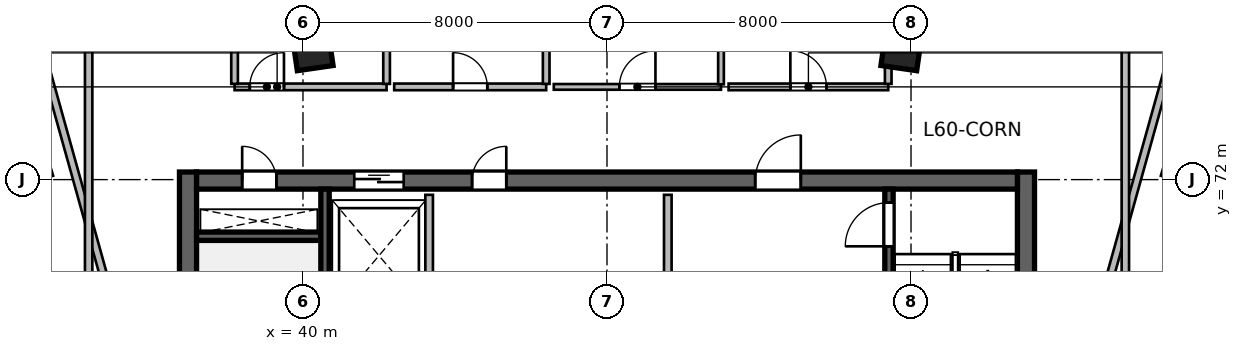
"""IFC4 building model, lengths in metres.
Left out: names, types, materials, properties, quantities, classifications, styles, units other than length and angle.
Written with IfcOpenShell. Run it as: python <this file> out.ifc"""

import sys

from ifc_helpers import new_model, si_unit, direction, frame, frame_2d, origin, origin_2d, place, context, subcontext, project, spatial, rectangle, extrude, source, transform, mapped, element, fill, save


model = new_model("IFC4")
c1 = context("Model", 3, precision=1e-05, world=origin(), true_north=direction((0.0, 1.0)))
c2 = subcontext(c1, "Body", "Model", "MODEL_VIEW")
j1 = project(units=[si_unit("LENGTHUNIT", "METRE"), si_unit("PLANEANGLEUNIT", "RADIAN")], contexts=[c1])
p1 = place(None, origin())
s1 = spatial("IfcSite", under=j1, at=p1, CompositionType="ELEMENT")
p2 = place(p1, origin())
s2 = spatial("IfcBuilding", under=s1, at=p2, CompositionType="ELEMENT")
p3 = place(p2, frame((0.0, 0.0, 246.9)))
s3 = spatial("IfcBuildingStorey", under=s2, at=p3, CompositionType="ELEMENT", Elevation=246.9)
m1 = source(origin(), c2, "Body", "SweptSolid", [
    extrude(rectangle(XDim=12.0, YDim=0.45, at=frame_2d((6.0, 0.0))), origin(), (0.0, 0.0, 1.0), 3.9),
])
for number, where, z_axis, x_axis in (
    (1, (36.975, 60.2, 0.0), (0.0, 0.0, 1.0), (0.0, 1.0, 0.0)),
    (2, (59.025, 60.2, 0.0), (0.0, 0.0, 1.0), (0.0, 1.0, 0.0)),
):
    element("IfcWall", number, at=place(p3, frame(where, z_axis=z_axis, x_axis=x_axis)), inside=s3, PredefinedType="SHEAR", context=c2, shape_type="MappedRepresentation", body=[
        mapped(m1, transform((0.0, 0.0, 0.0), scale=1.0)),
    ])
m2 = source(origin(), c2, "Body", "SweptSolid", [
    extrude(rectangle(XDim=21.6, YDim=0.45, at=frame_2d((10.8, 0.0))), origin(), (0.0, 0.0, 1.0), 3.9),
])
p4 = place(p3, frame((37.2, 71.975, 0.0), z_axis=(0.0, 0.0, 1.0), x_axis=(1.0, 0.0, 0.0)))
e3 = element("IfcWall", 3, at=p4, inside=s3, PredefinedType="SHEAR", context=c2, shape_type="MappedRepresentation", body=[
    mapped(m2, transform((0.0, 0.0, 0.0), scale=1.0)),
])
p5 = place(p4, frame((1.2, 0.0, 0.0)))
e4 = element("IfcOpeningElement", 4, at=p5, cuts=e3, PredefinedType="OPENING", context=c2, shape_type="SweptSolid", body=[
    extrude(rectangle(XDim=0.9, YDim=2.1, at=frame_2d((0.45, 1.05))), frame((0.0, 0.235, 0.0), z_axis=(0.0, -1.0, 0.0), x_axis=(1.0, 0.0, 0.0)), (0.0, 0.0, 1.0), 0.47),
])
p6 = place(p4, frame((14.7, 0.0, 0.0)))
e5 = element("IfcOpeningElement", 5, at=p6, cuts=e3, PredefinedType="OPENING", context=c2, shape_type="SweptSolid", body=[
    extrude(rectangle(XDim=1.2, YDim=2.15, at=frame_2d((0.6, 1.075))), frame((0.0, 0.235, 0.0), z_axis=(0.0, -1.0, 0.0), x_axis=(1.0, 0.0, 0.0)), (0.0, 0.0, 1.0), 0.47),
])
p7 = place(p4, frame((4.15, 0.0, 0.0)))
e6 = element("IfcOpeningElement", 6, at=p7, cuts=e3, PredefinedType="OPENING", context=c2, shape_type="SweptSolid", body=[
    extrude(rectangle(XDim=1.3, YDim=2.15, at=frame_2d((0.65, 1.075))), frame((0.0, 0.235, 0.0), z_axis=(0.0, -1.0, 0.0), x_axis=(1.0, 0.0, 0.0)), (0.0, 0.0, 1.0), 0.47),
])
p8 = place(p4, frame((7.25, 0.0, 0.0)))
e7 = element("IfcOpeningElement", 7, at=p8, cuts=e3, PredefinedType="OPENING", context=c2, shape_type="SweptSolid", body=[
    extrude(rectangle(XDim=0.9, YDim=2.1, at=frame_2d((0.45, 1.05))), frame((0.0, 0.235, 0.0), z_axis=(0.0, -1.0, 0.0), x_axis=(1.0, 0.0, 0.0)), (0.0, 0.0, 1.0), 0.47),
])
m3 = source(origin(), c2, "Body", "SweptSolid", [
    extrude(rectangle(XDim=3.27, YDim=0.22, at=frame_2d((1.635, 0.0))), origin(), (0.0, 0.0, 1.0), 3.9),
])
p9 = place(p3, frame((37.2, 70.51, 0.0), z_axis=(0.0, 0.0, 1.0), x_axis=(1.0, 0.0, 0.0)))
e8 = element("IfcWall", 8, at=p9, inside=s3, PredefinedType="SHEAR", context=c2, shape_type="MappedRepresentation", body=[
    mapped(m3, transform((0.0, 0.0, 0.0), scale=1.0)),
])
m4 = source(origin(), c2, "Body", "SweptSolid", [
    extrude(rectangle(XDim=11.1, YDim=0.22, at=frame_2d((5.55, 0.0))), origin(), (0.0, 0.0, 1.0), 3.9),
])
p10 = place(p3, frame((40.58, 60.65, 0.0), z_axis=(0.0, 0.0, 1.0), x_axis=(0.0, 1.0, 0.0)))
e9 = element("IfcWall", 9, at=p10, inside=s3, PredefinedType="SHEAR", context=c2, shape_type="MappedRepresentation", body=[
    mapped(m4, transform((0.0, 0.0, 0.0), scale=1.0)),
])
p11 = place(p3, frame((55.42, 60.65, 0.0), z_axis=(0.0, 0.0, 1.0), x_axis=(0.0, 1.0, 0.0)))
e10 = element("IfcWall", 10, at=p11, inside=s3, PredefinedType="SHEAR", context=c2, shape_type="MappedRepresentation", body=[
    mapped(m4, transform((0.0, 0.0, 0.0), scale=1.0)),
])
p12 = place(p11, frame((9.595, 0.0, 0.0)))
e11 = element("IfcOpeningElement", 11, at=p12, cuts=e10, PredefinedType="OPENING", context=c2, shape_type="SweptSolid", body=[
    extrude(rectangle(XDim=1.15, YDim=2.15, at=frame_2d((0.575, 1.075))), frame((0.0, 0.12, 0.0), z_axis=(0.0, -1.0, 0.0), x_axis=(1.0, 0.0, 0.0)), (0.0, 0.0, 1.0), 0.24),
])
m5 = source(origin(), c2, "Body", "SweptSolid", [
    extrude(rectangle(XDim=0.95, YDim=0.95, at=origin_2d()), origin(), (0.0, 0.0, 1.0), 3.9),
])
for number, where, z_axis, x_axis in (
    (12, (40.253, 75.404, 0.0), (0.0, 0.0, 1.0), (-0.143, 0.99, 0.0)),
    (13, (55.747, 75.404, 0.0), (0.0, 0.0, 1.0), (0.143, 0.99, 0.0)),
):
    element("IfcColumn", number, at=place(p3, frame(where, z_axis=z_axis, x_axis=x_axis)), inside=s3, PredefinedType="COLUMN", context=c2, shape_type="MappedRepresentation", body=[
        mapped(m5, transform((0.0, 0.0, 0.0), scale=1.0)),
    ])
m6 = source(origin(), c2, "Body", "SweptSolid", [
    extrude(rectangle(XDim=5.8, YDim=0.2, at=frame_2d((2.9, 0.0))), origin(), (0.0, 0.0, 1.0), 3.65),
])
p13 = place(p3, frame((49.6, 65.8, 0.0), z_axis=(0.0, 0.0, 1.0), x_axis=(0.0, 1.0, 0.0)))
e14 = element("IfcWall", 14, at=p13, inside=s3, PredefinedType="SOLIDWALL", context=c2, shape_type="MappedRepresentation", body=[
    mapped(m6, transform((0.0, 0.0, 0.0), scale=1.0)),
])
m7 = source(origin(), c2, "Body", "SweptSolid", [
    extrude(rectangle(XDim=3.2, YDim=0.2, at=frame_2d((1.6, 0.0))), origin(), (0.0, 0.0, 1.0), 3.65),
])
p14 = place(p3, frame((43.32, 68.4, 0.0), z_axis=(0.0, 0.0, 1.0), x_axis=(0.0, 1.0, 0.0)))
e15 = element("IfcWall", 15, at=p14, inside=s3, PredefinedType="SOLIDWALL", context=c2, shape_type="MappedRepresentation", body=[
    mapped(m7, transform((0.0, 0.0, 0.0), scale=1.0)),
])
m8 = source(origin(), c2, "Body", "SweptSolid", [
    extrude(rectangle(XDim=4.0, YDim=0.175, at=frame_2d((2.0, 0.0))), origin(), (0.0, 0.0, 1.0), 3.65),
])
p15 = place(p3, frame((38.2, 74.44, 0.0), z_axis=(0.0, 0.0, 1.0), x_axis=(1.0, 0.0, 0.0)))
e16 = element("IfcWall", 16, at=p15, inside=s3, PredefinedType="PARTITIONING", context=c2, shape_type="MappedRepresentation", body=[
    mapped(m8, transform((0.0, 0.0, 0.0), scale=1.0)),
])
p16 = place(p15, frame((0.4, 0.0, 0.0)))
e17 = element("IfcOpeningElement", 17, at=p16, cuts=e16, PredefinedType="OPENING", context=c2, shape_type="SweptSolid", body=[
    extrude(rectangle(XDim=0.9, YDim=2.08, at=frame_2d((0.45, 1.04))), frame((0.0, 0.098, 0.0), z_axis=(0.0, -1.0, 0.0), x_axis=(1.0, 0.0, 0.0)), (0.0, 0.0, 1.0), 0.195),
])
m9 = source(origin(), c2, "Body", "SweptSolid", [
    extrude(rectangle(XDim=2.403, YDim=0.175, at=frame_2d((1.201, 0.0))), origin(), (0.0, 0.0, 1.0), 3.65),
])
for number, where, z_axis, x_axis in (
    (18, (38.2, 74.519, 0.0), (0.0, 0.0, 1.0), (0.0, 1.0, 0.0)),
    (19, (42.2, 74.519, 0.0), (0.0, 0.0, 1.0), (0.0, 1.0, 0.0)),
):
    element("IfcWall", number, at=place(p3, frame(where, z_axis=z_axis, x_axis=x_axis)), inside=s3, PredefinedType="PARTITIONING", context=c2, shape_type="MappedRepresentation", body=[
        mapped(m9, transform((0.0, 0.0, 0.0), scale=1.0)),
    ])
p17 = place(p3, frame((42.4, 74.44, 0.0), z_axis=(0.0, 0.0, 1.0), x_axis=(1.0, 0.0, 0.0)))
e20 = element("IfcWall", 20, at=p17, inside=s3, PredefinedType="PARTITIONING", context=c2, shape_type="MappedRepresentation", body=[
    mapped(m8, transform((0.0, 0.0, 0.0), scale=1.0)),
])
p18 = place(p17, frame((1.55, 0.0, 0.0)))
e21 = element("IfcOpeningElement", 21, at=p18, cuts=e20, PredefinedType="OPENING", context=c2, shape_type="SweptSolid", body=[
    extrude(rectangle(XDim=0.9, YDim=2.08, at=frame_2d((0.45, 1.04))), frame((0.0, 0.098, 0.0), z_axis=(0.0, -1.0, 0.0), x_axis=(1.0, 0.0, 0.0)), (0.0, 0.0, 1.0), 0.195),
])
p19 = place(p3, frame((46.4, 74.519, 0.0), z_axis=(0.0, 0.0, 1.0), x_axis=(0.0, 1.0, 0.0)))
e22 = element("IfcWall", 22, at=p19, inside=s3, PredefinedType="PARTITIONING", context=c2, shape_type="MappedRepresentation", body=[
    mapped(m9, transform((0.0, 0.0, 0.0), scale=1.0)),
])
m10 = source(origin(), c2, "Body", "SweptSolid", [
    extrude(rectangle(XDim=4.4, YDim=0.15, at=frame_2d((2.2, 0.0))), origin(), (0.0, 0.0, 1.0), 3.65),
])
p20 = place(p3, frame((46.6, 74.44, 0.0), z_axis=(0.0, 0.0, 1.0), x_axis=(1.0, 0.0, 0.0)))
e23 = element("IfcWall", 23, at=p20, inside=s3, PredefinedType="PARTITIONING", context=c2, shape_type="MappedRepresentation", body=[
    mapped(m10, transform((0.0, 0.0, 0.0), scale=1.0)),
])
p21 = place(p20, frame((1.725, 0.0, 0.0)))
e24 = element("IfcOpeningElement", 24, at=p21, cuts=e23, PredefinedType="OPENING", context=c2, shape_type="SweptSolid", body=[
    extrude(rectangle(XDim=0.95, YDim=2.1, at=frame_2d((0.475, 1.05))), frame((0.0, 0.085, 0.0), z_axis=(0.0, -1.0, 0.0), x_axis=(1.0, 0.0, 0.0)), (0.0, 0.0, 1.0), 0.17),
])
m11 = source(origin(), c2, "Body", "SweptSolid", [
    extrude(rectangle(XDim=2.425, YDim=0.15, at=frame_2d((1.212, 0.0))), origin(), (0.0, 0.0, 1.0), 3.65),
])
p22 = place(p3, frame((51.0, 74.508, 0.0), z_axis=(0.0, 0.0, 1.0), x_axis=(0.0, 1.0, 0.0)))
e25 = element("IfcWall", 25, at=p22, inside=s3, PredefinedType="PARTITIONING", context=c2, shape_type="MappedRepresentation", body=[
    mapped(m11, transform((0.0, 0.0, 0.0), scale=1.0)),
])
m12 = source(origin(), c2, "Body", "SweptSolid", [
    extrude(rectangle(XDim=4.2, YDim=0.175, at=frame_2d((2.1, 0.0))), origin(), (0.0, 0.0, 1.0), 3.65),
])
p23 = place(p3, frame((51.2, 74.44, 0.0), z_axis=(0.0, 0.0, 1.0), x_axis=(1.0, 0.0, 0.0)))
e26 = element("IfcWall", 26, at=p23, inside=s3, PredefinedType="PARTITIONING", context=c2, shape_type="MappedRepresentation", body=[
    mapped(m12, transform((0.0, 0.0, 0.0), scale=1.0)),
])
p24 = place(p23, frame((1.625, 0.0, 0.0)))
e27 = element("IfcOpeningElement", 27, at=p24, cuts=e26, PredefinedType="OPENING", context=c2, shape_type="SweptSolid", body=[
    extrude(rectangle(XDim=0.95, YDim=2.12, at=frame_2d((0.475, 1.06))), frame((0.0, 0.098, 0.0), z_axis=(0.0, -1.0, 0.0), x_axis=(1.0, 0.0, 0.0)), (0.0, 0.0, 1.0), 0.195),
])
p25 = place(p3, frame((55.4, 74.519, 0.0), z_axis=(0.0, 0.0, 1.0), x_axis=(0.0, 1.0, 0.0)))
e28 = element("IfcWall", 28, at=p25, inside=s3, PredefinedType="PARTITIONING", context=c2, shape_type="MappedRepresentation", body=[
    mapped(m9, transform((0.0, 0.0, 0.0), scale=1.0)),
])
m13 = source(origin(), c2, "Body", "SweptSolid", [
    extrude(rectangle(XDim=13.169, YDim=0.195, at=frame_2d((6.585, 0.0))), origin(), (0.0, 0.0, 1.0), 3.65),
])
p26 = place(p3, frame((36.5, 63.216, 0.0), z_axis=(0.0, 0.0, 1.0), x_axis=(-0.26875376985, 0.963208913576, 0.0)))
e29 = element("IfcWall", 29, at=p26, inside=s3, PredefinedType="PARTITIONING", context=c2, shape_type="MappedRepresentation", body=[
    mapped(m13, transform((0.0, 0.0, 0.0), scale=1.0)),
])
m14 = source(origin(), c2, "Body", "SweptSolid", [
    extrude(rectangle(XDim=18.567, YDim=0.195, at=frame_2d((9.284, 0.0))), origin(), (0.0, 0.0, 1.0), 3.65),
])
p27 = place(p3, frame((34.36, 57.96, 0.0), z_axis=(0.0, 0.0, 1.0), x_axis=(0.0, 1.0, 0.0)))
e30 = element("IfcWall", 30, at=p27, inside=s3, PredefinedType="PARTITIONING", context=c2, shape_type="MappedRepresentation", body=[
    mapped(m14, transform((0.0, 0.0, 0.0), scale=1.0)),
])
m15 = source(origin(), c2, "Body", "SweptSolid", [
    extrude(rectangle(XDim=13.161, YDim=0.195, at=frame_2d((6.581, 0.0))), origin(), (0.0, 0.0, 1.0), 3.65),
])
p28 = place(p3, frame((59.5, 63.216, 0.0), z_axis=(0.0, 0.0, 1.0), x_axis=(0.268752541286, 0.963209256368, 0.0)))
e31 = element("IfcWall", 31, at=p28, inside=s3, PredefinedType="PARTITIONING", context=c2, shape_type="MappedRepresentation", body=[
    mapped(m15, transform((0.0, 0.0, 0.0), scale=1.0)),
])
m16 = source(origin(), c2, "Body", "SweptSolid", [
    extrude(rectangle(XDim=18.471, YDim=0.195, at=frame_2d((9.235, 0.0))), origin(), (0.0, 0.0, 1.0), 3.65),
])
p29 = place(p3, frame((61.333, 55.602, 0.0), z_axis=(0.0, 0.0, 1.0), x_axis=(0.368827756565, 0.929497760076, 0.0)))
e32 = element("IfcWall", 32, at=p29, inside=s3, PredefinedType="PARTITIONING", context=c2, shape_type="MappedRepresentation", body=[
    mapped(m16, transform((0.0, 0.0, 0.0), scale=1.0)),
])
m17 = source(origin(), c2, "Body", "SweptSolid", [
    extrude(rectangle(XDim=18.567, YDim=0.195, at=frame_2d((9.284, 0.0))), origin(), (0.0, 0.0, 1.0), 3.65),
])
p30 = place(p3, frame((61.64, 57.96, 0.0), z_axis=(0.0, 0.0, 1.0), x_axis=(0.0, 1.0, 0.0)))
e33 = element("IfcWall", 33, at=p30, inside=s3, PredefinedType="PARTITIONING", context=c2, shape_type="MappedRepresentation", body=[
    mapped(m17, transform((0.0, 0.0, 0.0), scale=1.0)),
])
m18 = source(origin(), c2, "Body", "SweptSolid", [
    extrude(rectangle(XDim=0.9, YDim=2.1, at=frame_2d((0.45, 1.05))), frame((0.0, 0.025, 0.0), z_axis=(0.0, -1.0, 0.0), x_axis=(1.0, 0.0, 0.0)), (0.0, 0.0, 1.0), 0.05),
])
p31 = place(p5, origin())
e34 = element("IfcDoor", 34, at=p31, inside=s3, OperationType="SINGLE_SWING_LEFT", PredefinedType="DOOR", context=c2, shape_type="MappedRepresentation", body=[
    mapped(m18, transform((0.0, 0.0, 0.0), scale=1.0)),
])
fill(e4, e34)
m19 = source(origin(), c2, "Body", "SweptSolid", [
    extrude(rectangle(XDim=1.15, YDim=2.15, at=frame_2d((0.575, 1.075))), frame((0.0, 0.025, 0.0), z_axis=(0.0, -1.0, 0.0), x_axis=(1.0, 0.0, 0.0)), (0.0, 0.0, 1.0), 0.05),
])
p32 = place(p12, origin())
e35 = element("IfcDoor", 35, at=p32, inside=s3, OperationType="SINGLE_SWING_LEFT", PredefinedType="DOOR", context=c2, shape_type="MappedRepresentation", body=[
    mapped(m19, transform((0.0, 0.0, 0.0), scale=1.0)),
])
fill(e11, e35)
m20 = source(origin(), c2, "Body", "SweptSolid", [
    extrude(rectangle(XDim=1.2, YDim=2.15, at=frame_2d((0.6, 1.075))), frame((0.0, 0.025, 0.0), z_axis=(0.0, -1.0, 0.0), x_axis=(1.0, 0.0, 0.0)), (0.0, 0.0, 1.0), 0.05),
])
p33 = place(p6, origin())
e36 = element("IfcDoor", 36, at=p33, inside=s3, OperationType="SINGLE_SWING_RIGHT", PredefinedType="DOOR", context=c2, shape_type="MappedRepresentation", body=[
    mapped(m20, transform((0.0, 0.0, 0.0), scale=1.0)),
])
fill(e5, e36)
m21 = source(origin(), c2, "Body", "SweptSolid", [
    extrude(rectangle(XDim=1.3, YDim=2.15, at=frame_2d((0.65, 1.075))), frame((0.0, 0.025, 0.0), z_axis=(0.0, -1.0, 0.0), x_axis=(1.0, 0.0, 0.0)), (0.0, 0.0, 1.0), 0.05),
])
p34 = place(p7, origin())
e37 = element("IfcDoor", 37, at=p34, inside=s3, OperationType="DOUBLE_DOOR_SLIDING", PredefinedType="DOOR", context=c2, shape_type="MappedRepresentation", body=[
    mapped(m21, transform((0.0, 0.0, 0.0), scale=1.0)),
])
fill(e6, e37)
p35 = place(p8, origin())
e38 = element("IfcDoor", 38, at=p35, inside=s3, OperationType="SINGLE_SWING_RIGHT", PredefinedType="DOOR", context=c2, shape_type="MappedRepresentation", body=[
    mapped(m18, transform((0.0, 0.0, 0.0), scale=1.0)),
])
fill(e7, e38)
m22 = source(origin(), c2, "Body", "SweptSolid", [
    extrude(rectangle(XDim=0.9, YDim=2.08, at=frame_2d((0.45, 1.04))), frame((0.0, 0.025, 0.0), z_axis=(0.0, -1.0, 0.0), x_axis=(1.0, 0.0, 0.0)), (0.0, 0.0, 1.0), 0.05),
])
p36 = place(p16, origin())
e39 = element("IfcDoor", 39, at=p36, inside=s3, OperationType="SINGLE_SWING_RIGHT", PredefinedType="DOOR", context=c2, shape_type="MappedRepresentation", body=[
    mapped(m22, transform((0.0, 0.0, 0.0), scale=1.0)),
])
fill(e17, e39)
p37 = place(p18, origin())
e40 = element("IfcDoor", 40, at=p37, inside=s3, OperationType="SINGLE_SWING_LEFT", PredefinedType="DOOR", context=c2, shape_type="MappedRepresentation", body=[
    mapped(m22, transform((0.0, 0.0, 0.0), scale=1.0)),
])
fill(e21, e40)
m23 = source(origin(), c2, "Body", "SweptSolid", [
    extrude(rectangle(XDim=0.95, YDim=2.1, at=frame_2d((0.475, 1.05))), frame((0.0, 0.025, 0.0), z_axis=(0.0, -1.0, 0.0), x_axis=(1.0, 0.0, 0.0)), (0.0, 0.0, 1.0), 0.05),
])
p38 = place(p21, origin())
e41 = element("IfcDoor", 41, at=p38, inside=s3, OperationType="SINGLE_SWING_RIGHT", PredefinedType="DOOR", context=c2, shape_type="MappedRepresentation", body=[
    mapped(m23, transform((0.0, 0.0, 0.0), scale=1.0)),
])
fill(e24, e41)
m24 = source(origin(), c2, "Body", "SweptSolid", [
    extrude(rectangle(XDim=0.95, YDim=2.12, at=frame_2d((0.475, 1.06))), frame((0.0, 0.025, 0.0), z_axis=(0.0, -1.0, 0.0), x_axis=(1.0, 0.0, 0.0)), (0.0, 0.0, 1.0), 0.05),
])
p39 = place(p24, origin())
e42 = element("IfcDoor", 42, at=p39, inside=s3, OperationType="SINGLE_SWING_LEFT", PredefinedType="DOOR", context=c2, shape_type="MappedRepresentation", body=[
    mapped(m24, transform((0.0, 0.0, 0.0), scale=1.0)),
])
fill(e27, e42)
save(model, sys.argv[1])
